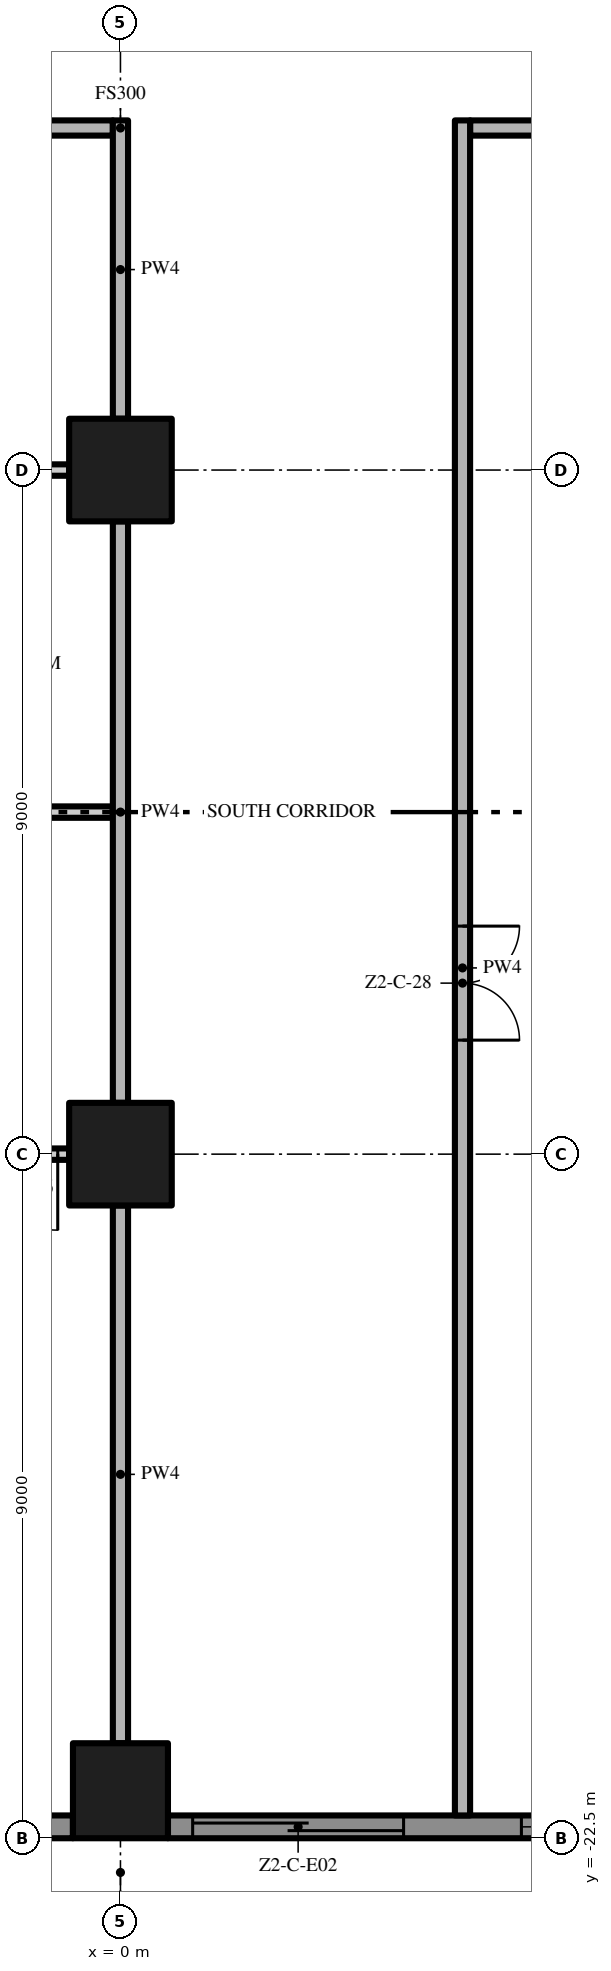
"""IFC4 building model, lengths in metres.
Left out: names, types, materials, properties, quantities, classifications, styles, units other than length and angle.
Written with IfcOpenShell. Run it as: python <this file> out.ifc"""

import sys

from ifc_helpers import new_model, si_unit, direction, frame, frame_2d, origin, origin_2d, place, context, subcontext, project, spatial, polyline, rectangle, outline, extrude, element, fill, save


model = new_model("IFC4")
c1 = context("Model", 3, precision=1e-05, world=origin(), true_north=direction((0.0, 1.0)))
c2 = subcontext(c1, "Body", "Model", "MODEL_VIEW")
j1 = project(units=[si_unit("LENGTHUNIT", "METRE"), si_unit("PLANEANGLEUNIT", "RADIAN")], contexts=[c1])
p1 = place(None, origin())
s1 = spatial("IfcSite", under=j1, at=p1, CompositionType="ELEMENT")
p2 = place(p1, origin())
s2 = spatial("IfcBuilding", under=s1, at=p2, CompositionType="ELEMENT")
p3 = place(p2, frame((0.0, 0.0, 99.8)))
s3 = spatial("IfcBuildingStorey", under=s2, at=p3, CompositionType="ELEMENT", Elevation=99.8)
p4 = place(p3, frame((0.0, -13.5, 0.0), z_axis=(0.0, 0.0, 1.0), x_axis=(1.0, 0.0, 0.0)))
e1 = element("IfcColumn", 1, at=p4, inside=s3, PredefinedType="COLUMN", context=c2, shape_type="SweptSolid", body=[
    extrude(rectangle(XDim=1.35, YDim=1.35, at=origin_2d()), origin(), (0.0, 0.0, 1.0), 3.5),
])
p5 = place(p3, frame((0.0, -21.875, 0.0), z_axis=(0.0, 0.0, 1.0), x_axis=(1.0, 0.0, 0.0)))
e2 = element("IfcColumn", 2, at=p5, inside=s3, PredefinedType="COLUMN", context=c2, shape_type="SweptSolid", body=[
    extrude(rectangle(XDim=1.25, YDim=1.25, at=origin_2d()), origin(), (0.0, 0.0, 1.0), 3.5),
])
p6 = place(p3, frame((0.0, -4.5, 0.0), z_axis=(0.0, 0.0, 1.0), x_axis=(1.0, 0.0, 0.0)))
e3 = element("IfcColumn", 3, at=p6, inside=s3, PredefinedType="COLUMN", context=c2, shape_type="SweptSolid", body=[
    extrude(rectangle(XDim=1.35, YDim=1.35, at=origin_2d()), origin(), (0.0, 0.0, 1.0), 3.5),
])
p7 = place(p3, frame((-0.625, -22.35, 0.0), z_axis=(0.0, 0.0, 1.0), x_axis=(-1.0, 0.0, 0.0)))
e4 = element("IfcWall", 4, at=p7, inside=s3, PredefinedType="SOLIDWALL", context=c2, shape_type="SweptSolid", body=[
    extrude(rectangle(XDim=7.75, YDim=0.3, at=frame_2d((3.875, 0.0))), origin(), (0.0, 0.0, 1.0), 3.5),
])
p8 = place(p7, frame((4.65, 0.0, 0.45)))
e5 = element("IfcOpeningElement", 5, at=p8, cuts=e4, PredefinedType="OPENING", context=c2, shape_type="SweptSolid", body=[
    extrude(rectangle(XDim=2.775, YDim=2.65, at=frame_2d((1.387, 1.325))), frame((0.0, 0.16, 0.0), z_axis=(0.0, -1.0, 0.0), x_axis=(1.0, 0.0, 0.0)), (0.0, 0.0, 1.0), 0.32),
])
p9 = place(p7, frame((0.325, 0.0, 0.0)))
e6 = element("IfcOpeningElement", 6, at=p9, cuts=e4, PredefinedType="OPENING", context=c2, shape_type="SweptSolid", body=[
    extrude(rectangle(XDim=2.775, YDim=2.4, at=frame_2d((1.387, 1.2))), frame((0.0, 0.16, 0.0), z_axis=(0.0, -1.0, 0.0), x_axis=(1.0, 0.0, 0.0)), (0.0, 0.0, 1.0), 0.32),
])
p10 = place(p3, frame((8.375, -22.35, 0.0), z_axis=(0.0, 0.0, 1.0), x_axis=(-1.0, 0.0, 0.0)))
e7 = element("IfcWall", 7, at=p10, inside=s3, PredefinedType="SOLIDWALL", context=c2, shape_type="SweptSolid", body=[
    extrude(rectangle(XDim=7.75, YDim=0.3, at=frame_2d((3.875, 0.0))), origin(), (0.0, 0.0, 1.0), 3.5),
])
p11 = place(p10, frame((4.65, 0.0, 0.0)))
e8 = element("IfcOpeningElement", 8, at=p11, cuts=e7, PredefinedType="OPENING", context=c2, shape_type="SweptSolid", body=[
    extrude(rectangle(XDim=2.775, YDim=2.4, at=frame_2d((1.387, 1.2))), frame((0.0, 0.16, 0.0), z_axis=(0.0, -1.0, 0.0), x_axis=(1.0, 0.0, 0.0)), (0.0, 0.0, 1.0), 0.32),
])
p12 = place(p10, frame((0.325, 0.0, 0.45)))
e9 = element("IfcOpeningElement", 9, at=p12, cuts=e7, PredefinedType="OPENING", context=c2, shape_type="SweptSolid", body=[
    extrude(rectangle(XDim=2.775, YDim=2.65, at=frame_2d((1.387, 1.325))), frame((0.0, 0.16, 0.0), z_axis=(0.0, -1.0, 0.0), x_axis=(1.0, 0.0, 0.0)), (0.0, 0.0, 1.0), 0.32),
])
p13 = place(p3, origin())
e10 = element("IfcWall", 10, at=p13, inside=s3, PredefinedType="USERDEFINED", context=c2, shape_type="SweptSolid", body=[
    extrude(outline(polyline([(-22.5, -23.1), (-21.0, -23.329), (-19.5, -23.929), (-18.0, -24.671), (-16.5, -25.271), (-15.0, -25.5), (-13.5, -25.271), (-12.0, -24.671), (-10.5, -23.929), (-9.0, -23.329), (-7.5, -23.1), (-6.0, -23.329), (-4.5, -23.929), (-3.0, -24.671), (-1.5, -25.271), (0.0, -25.5), (1.5, -25.271), (3.0, -24.671), (4.5, -23.929), (6.0, -23.329), (7.5, -23.1), (9.0, -23.329), (10.5, -23.929), (12.0, -24.671), (13.5, -25.271), (15.0, -25.5), (16.5, -25.271), (18.0, -24.671), (19.5, -23.929), (21.0, -23.329), (22.5, -23.1), (22.462, -22.853), (20.934, -23.086), (19.398, -23.701), (17.898, -24.442), (16.434, -25.028), (15.0, -25.247), (13.566, -25.028), (12.102, -24.442), (10.602, -23.701), (9.066, -23.086), (7.5, -22.847), (5.934, -23.086), (4.398, -23.701), (2.898, -24.442), (1.434, -25.028), (0.0, -25.247), (-1.434, -25.028), (-2.898, -24.442), (-4.398, -23.701), (-5.934, -23.086), (-7.5, -22.847), (-9.066, -23.086), (-10.602, -23.701), (-12.102, -24.442), (-13.566, -25.028), (-15.0, -25.247), (-16.434, -25.028), (-17.898, -24.442), (-19.398, -23.701), (-20.934, -23.086), (-22.462, -22.853), (-22.5, -23.1)])), origin(), (0.0, 0.0, 1.0), 0.9),
])
p14 = place(p3, frame((-0.675, -13.5, 0.0), z_axis=(0.0, 0.0, 1.0), x_axis=(-1.0, 0.0, 0.0)))
e11 = element("IfcWall", 11, at=p14, inside=s3, PredefinedType="PARTITIONING", context=c2, shape_type="SweptSolid", body=[
    extrude(rectangle(XDim=7.65, YDim=0.15, at=frame_2d((3.825, 0.0))), origin(), (0.0, 0.0, 1.0), 3.5),
])
p15 = place(p14, frame((6.5, 0.0, 0.0)))
e12 = element("IfcOpeningElement", 12, at=p15, cuts=e11, PredefinedType="OPENING", context=c2, shape_type="SweptSolid", body=[
    extrude(rectangle(XDim=1.0, YDim=2.4, at=frame_2d((0.5, 1.2))), frame((0.0, 0.085, 0.0), z_axis=(0.0, -1.0, 0.0), x_axis=(1.0, 0.0, 0.0)), (0.0, 0.0, 1.0), 0.17),
])
p16 = place(p14, frame((0.15, 0.0, 0.0)))
e13 = element("IfcOpeningElement", 13, at=p16, cuts=e11, PredefinedType="OPENING", context=c2, shape_type="SweptSolid", body=[
    extrude(rectangle(XDim=1.0, YDim=2.4, at=frame_2d((0.5, 1.2))), frame((0.0, 0.085, 0.0), z_axis=(0.0, -1.0, 0.0), x_axis=(1.0, 0.0, 0.0)), (0.0, 0.0, 1.0), 0.17),
])
p17 = place(p3, frame((-11.925, -9.0, 0.0), z_axis=(0.0, 0.0, 1.0), x_axis=(1.0, 0.0, 0.0)))
e14 = element("IfcWall", 14, at=p17, inside=s3, PredefinedType="PARTITIONING", context=c2, shape_type="SweptSolid", body=[
    extrude(rectangle(XDim=11.825, YDim=0.15, at=frame_2d((5.912, 0.0))), origin(), (0.0, 0.0, 1.0), 3.5),
])
p18 = place(p17, frame((1.0, 0.0, 0.0)))
e15 = element("IfcOpeningElement", 15, at=p18, cuts=e14, PredefinedType="OPENING", context=c2, shape_type="SweptSolid", body=[
    extrude(rectangle(XDim=0.9, YDim=2.1, at=frame_2d((0.45, 1.05))), frame((0.0, 0.085, 0.0), z_axis=(0.0, -1.0, 0.0), x_axis=(1.0, 0.0, 0.0)), (0.0, 0.0, 1.0), 0.17),
])
p19 = place(p17, frame((5.075, 0.0, 0.0)))
e16 = element("IfcOpeningElement", 16, at=p19, cuts=e14, PredefinedType="OPENING", context=c2, shape_type="SweptSolid", body=[
    extrude(rectangle(XDim=0.9, YDim=2.1, at=frame_2d((0.45, 1.05))), frame((0.0, 0.085, 0.0), z_axis=(0.0, -1.0, 0.0), x_axis=(1.0, 0.0, 0.0)), (0.0, 0.0, 1.0), 0.17),
])
p20 = place(p3, frame((-8.325, -4.5, 0.0), z_axis=(0.0, 0.0, 1.0), x_axis=(1.0, 0.0, 0.0)))
e17 = element("IfcWall", 17, at=p20, inside=s3, PredefinedType="PARTITIONING", context=c2, shape_type="SweptSolid", body=[
    extrude(rectangle(XDim=7.65, YDim=0.15, at=frame_2d((3.825, 0.0))), origin(), (0.0, 0.0, 1.0), 3.5),
])
p21 = place(p3, frame((-0.1, 0.0, 0.0), z_axis=(0.0, 0.0, 1.0), x_axis=(-1.0, 0.0, 0.0)))
e18 = element("IfcWall", 18, at=p21, inside=s3, PredefinedType="PARTITIONING", context=c2, shape_type="SweptSolid", body=[
    extrude(rectangle(XDim=17.3, YDim=0.2, at=frame_2d((8.65, 0.0))), origin(), (0.0, 0.0, 1.0), 3.5),
])
p22 = place(p21, frame((8.15, 0.0, 0.0)))
e19 = element("IfcOpeningElement", 19, at=p22, cuts=e18, PredefinedType="OPENING", context=c2, shape_type="SweptSolid", body=[
    extrude(rectangle(XDim=1.5, YDim=2.4, at=frame_2d((0.75, 1.2))), frame((0.0, 0.11, 0.0), z_axis=(0.0, -1.0, 0.0), x_axis=(1.0, 0.0, 0.0)), (0.0, 0.0, 1.0), 0.22),
])
p23 = place(p3, frame((4.6, 0.0, 0.0), z_axis=(0.0, 0.0, 1.0), x_axis=(1.0, 0.0, 0.0)))
e20 = element("IfcWall", 20, at=p23, inside=s3, PredefinedType="PARTITIONING", context=c2, shape_type="SweptSolid", body=[
    extrude(rectangle(XDim=12.8, YDim=0.2, at=frame_2d((6.4, 0.0))), origin(), (0.0, 0.0, 1.0), 3.5),
])
p24 = place(p3, frame((0.0, -21.25, 0.0), z_axis=(0.0, 0.0, 1.0), x_axis=(0.0, 1.0, 0.0)))
e21 = element("IfcWall", 21, at=p24, inside=s3, PredefinedType="PARTITIONING", context=c2, shape_type="SweptSolid", body=[
    extrude(rectangle(XDim=7.075, YDim=0.2, at=frame_2d((3.538, 0.0))), origin(), (0.0, 0.0, 1.0), 3.5),
])
p25 = place(p3, frame((0.0, -12.825, 0.0), z_axis=(0.0, 0.0, 1.0), x_axis=(0.0, 1.0, 0.0)))
e22 = element("IfcWall", 22, at=p25, inside=s3, PredefinedType="PARTITIONING", context=c2, shape_type="SweptSolid", body=[
    extrude(rectangle(XDim=7.65, YDim=0.2, at=frame_2d((3.825, 0.0))), origin(), (0.0, 0.0, 1.0), 3.5),
])
p26 = place(p3, frame((0.0, -3.825, 0.0), z_axis=(0.0, 0.0, 1.0), x_axis=(0.0, 1.0, 0.0)))
e23 = element("IfcWall", 23, at=p26, inside=s3, PredefinedType="PARTITIONING", context=c2, shape_type="SweptSolid", body=[
    extrude(rectangle(XDim=3.925, YDim=0.2, at=frame_2d((1.962, 0.0))), origin(), (0.0, 0.0, 1.0), 3.5),
])
p27 = place(p3, frame((4.5, 0.1, 0.0), z_axis=(0.0, 0.0, 1.0), x_axis=(0.0, -1.0, 0.0)))
e24 = element("IfcWall", 24, at=p27, inside=s3, PredefinedType="PARTITIONING", context=c2, shape_type="SweptSolid", body=[
    extrude(rectangle(XDim=22.3, YDim=0.2, at=frame_2d((11.15, 0.0))), origin(), (0.0, 0.0, 1.0), 3.5),
])
p28 = place(p27, frame((10.6, 0.0, 0.0)))
e25 = element("IfcOpeningElement", 25, at=p28, cuts=e24, PredefinedType="OPENING", context=c2, shape_type="SweptSolid", body=[
    extrude(rectangle(XDim=1.5, YDim=2.4, at=frame_2d((0.75, 1.2))), frame((0.0, 0.11, 0.0), z_axis=(0.0, -1.0, 0.0), x_axis=(1.0, 0.0, 0.0)), (0.0, 0.0, 1.0), 0.22),
])
p29 = place(p11, origin())
e26 = element("IfcDoor", 26, at=p29, inside=s3, OperationType="SINGLE_SWING_LEFT", PredefinedType="DOOR", context=c2, shape_type="SweptSolid", body=[
    extrude(rectangle(XDim=2.775, YDim=2.4, at=frame_2d((1.387, 1.2))), frame((0.0, 0.025, 0.0), z_axis=(0.0, -1.0, 0.0), x_axis=(1.0, 0.0, 0.0)), (0.0, 0.0, 1.0), 0.05),
])
fill(e8, e26)
p30 = place(p12, origin())
e27 = element("IfcWindow", 27, at=p30, inside=s3, PartitioningType="SINGLE_PANEL", PredefinedType="WINDOW", context=c2, shape_type="SweptSolid", body=[
    extrude(rectangle(XDim=2.775, YDim=2.65, at=frame_2d((1.387, 1.325))), frame((0.0, 0.03, 0.0), z_axis=(0.0, -1.0, 0.0), x_axis=(1.0, 0.0, 0.0)), (0.0, 0.0, 1.0), 0.06),
])
fill(e9, e27)
p31 = place(p16, origin())
e28 = element("IfcDoor", 28, at=p31, inside=s3, OperationType="SINGLE_SWING_LEFT", PredefinedType="DOOR", context=c2, shape_type="SweptSolid", body=[
    extrude(rectangle(XDim=1.0, YDim=2.4, at=frame_2d((0.5, 1.2))), frame((0.0, 0.025, 0.0), z_axis=(0.0, -1.0, 0.0), x_axis=(1.0, 0.0, 0.0)), (0.0, 0.0, 1.0), 0.05),
])
fill(e13, e28)
p32 = place(p28, origin())
e29 = element("IfcDoor", 29, at=p32, inside=s3, OperationType="DOUBLE_DOOR_SINGLE_SWING", PredefinedType="DOOR", context=c2, shape_type="SweptSolid", body=[
    extrude(rectangle(XDim=1.5, YDim=2.4, at=frame_2d((0.75, 1.2))), frame((0.0, 0.025, 0.0), z_axis=(0.0, -1.0, 0.0), x_axis=(1.0, 0.0, 0.0)), (0.0, 0.0, 1.0), 0.05),
])
fill(e25, e29)
save(model, sys.argv[1])
